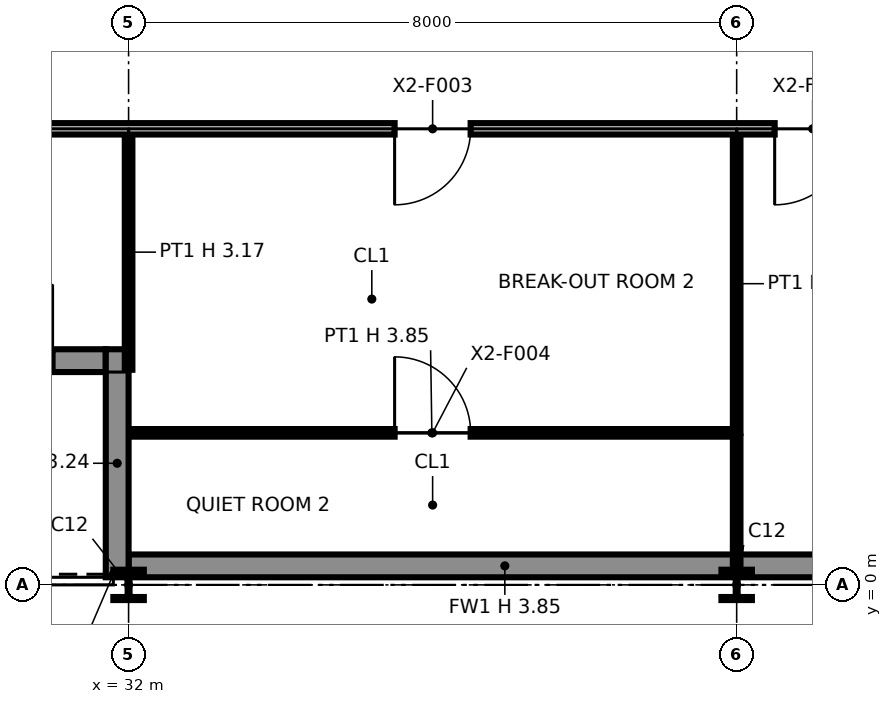
"""IFC4 building model, lengths in metres.
Left out: names, types, materials, properties, quantities, classifications, styles, units other than length and angle.
Written with IfcOpenShell. Run it as: python <this file> out.ifc"""

import sys

from ifc_helpers import new_model, si_unit, direction, frame, frame_2d, origin, origin_2d, place, context, subcontext, project, spatial, rectangle, i_section, extrude, element, fill, save


model = new_model("IFC4")
c1 = context("Model", 3, precision=1e-05, world=origin(), true_north=direction((0.0, 1.0)))
c2 = subcontext(c1, "Body", "Model", "MODEL_VIEW")
j1 = project(units=[si_unit("LENGTHUNIT", "METRE"), si_unit("PLANEANGLEUNIT", "RADIAN")], contexts=[c1])
p1 = place(None, origin())
s1 = spatial("IfcSite", under=j1, at=p1, CompositionType="ELEMENT")
p2 = place(p1, origin())
s2 = spatial("IfcBuilding", under=s1, at=p2, CompositionType="ELEMENT")
p3 = place(p2, frame((0.0, 0.0, 263.0)))
s3 = spatial("IfcBuildingStorey", under=s2, at=p3, CompositionType="ELEMENT", Elevation=263.0)
for number, where, z_axis, x_axis in (
    (1, (32.0, 0.0, 0.0), (0.0, 0.0, 1.0), (1.0, 0.0, 0.0)),
    (2, (40.0, 0.0, 0.0), (0.0, 0.0, 1.0), (1.0, 0.0, 0.0)),
):
    element("IfcColumn", number, at=place(p3, frame(where, z_axis=z_axis, x_axis=x_axis)), inside=s3, PredefinedType="COLUMN", context=c2, shape_type="SweptSolid", body=[
        extrude(i_section(OverallWidth=0.401, OverallDepth=0.399, WebThickness=0.025, FlangeThickness=0.04, at=origin_2d()), origin(), (0.0, 0.0, 1.0), 3.85),
    ])
p4 = place(p3, frame((24.3, 2.95, 0.0), z_axis=(0.0, 0.0, 1.0), x_axis=(1.0, 0.0, 0.0)))
e3 = element("IfcWall", 3, at=p4, inside=s3, PredefinedType="SOLIDWALL", context=c2, shape_type="SweptSolid", body=[
    extrude(rectangle(XDim=7.4, YDim=0.3, at=frame_2d((3.7, 0.0))), origin(), (0.0, 0.0, 1.0), 3.85),
])
p5 = place(p4, frame((0.3, 0.0, 0.9)))
e4 = element("IfcOpeningElement", 4, at=p5, cuts=e3, PredefinedType="OPENING", context=c2, shape_type="SweptSolid", body=[
    extrude(rectangle(XDim=2.8, YDim=2.2, at=frame_2d((1.4, 1.1))), frame((0.0, 0.16, 0.0), z_axis=(0.0, -1.0, 0.0), x_axis=(1.0, 0.0, 0.0)), (0.0, 0.0, 1.0), 0.32),
])
p6 = place(p4, frame((4.7, 0.0, 0.0)))
e5 = element("IfcOpeningElement", 5, at=p6, cuts=e3, PredefinedType="OPENING", context=c2, shape_type="SweptSolid", body=[
    extrude(rectangle(XDim=2.0, YDim=2.4, at=frame_2d((1.0, 1.2))), frame((0.0, 0.16, 0.0), z_axis=(0.0, -1.0, 0.0), x_axis=(1.0, 0.0, 0.0)), (0.0, 0.0, 1.0), 0.32),
])
p7 = place(p3, frame((31.85, 0.1, 0.0), z_axis=(0.0, 0.0, 1.0), x_axis=(0.0, 1.0, 0.0)))
e6 = element("IfcWall", 6, at=p7, inside=s3, PredefinedType="SOLIDWALL", context=c2, shape_type="SweptSolid", body=[
    extrude(rectangle(XDim=3.0, YDim=0.3, at=frame_2d((1.5, 0.0))), origin(), (0.0, 0.0, 1.0), 3.237),
])
p8 = place(p3, frame((32.0, 0.25, 0.0), z_axis=(0.0, 0.0, 1.0), x_axis=(1.0, 0.0, 0.0)))
e7 = element("IfcWall", 7, at=p8, inside=s3, PredefinedType="SOLIDWALL", context=c2, shape_type="SweptSolid", body=[
    extrude(rectangle(XDim=9.9, YDim=0.3, at=frame_2d((4.95, 0.0))), origin(), (0.0, 0.0, 1.0), 3.85),
])
p9 = place(p3, frame((40.0, 0.13, 0.0), z_axis=(0.0, 0.0, 1.0), x_axis=(0.0, 1.0, 0.0)))
e8 = element("IfcWall", 8, at=p9, inside=s3, PredefinedType="PARTITIONING", context=c2, shape_type="SweptSolid", body=[
    extrude(rectangle(XDim=1.82, YDim=0.1, at=frame_2d((0.91, 0.0))), origin(), (0.0, 0.0, 1.0), 3.172),
])
p10 = place(p3, frame((32.03, 2.0, 0.0), z_axis=(0.0, 0.0, 1.0), x_axis=(1.0, 0.0, 0.0)))
e9 = element("IfcWall", 9, at=p10, inside=s3, PredefinedType="PARTITIONING", context=c2, shape_type="SweptSolid", body=[
    extrude(rectangle(XDim=7.92, YDim=0.1, at=frame_2d((3.96, 0.0))), origin(), (0.0, 0.0, 1.0), 3.85),
])
p11 = place(p10, frame((3.47, 0.0, 0.0)))
e10 = element("IfcOpeningElement", 10, at=p11, cuts=e9, PredefinedType="OPENING", context=c2, shape_type="SweptSolid", body=[
    extrude(rectangle(XDim=1.0, YDim=2.1, at=frame_2d((0.5, 1.05))), frame((0.0, 0.06, 0.0), z_axis=(0.0, -1.0, 0.0), x_axis=(1.0, 0.0, 0.0)), (0.0, 0.0, 1.0), 0.12),
])
p12 = place(p3, frame((40.0, 2.0, 0.0), z_axis=(0.0, 0.0, 1.0), x_axis=(0.0, 1.0, 0.0)))
e11 = element("IfcWall", 11, at=p12, inside=s3, PredefinedType="PARTITIONING", context=c2, shape_type="SweptSolid", body=[
    extrude(rectangle(XDim=3.925, YDim=0.1, at=frame_2d((1.962, 0.0))), origin(), (0.0, 0.0, 1.0), 3.172),
])
p13 = place(p3, frame((32.0, 2.83, 0.0), z_axis=(0.0, 0.0, 1.0), x_axis=(0.0, 1.0, 0.0)))
e12 = element("IfcWall", 12, at=p13, inside=s3, PredefinedType="PARTITIONING", context=c2, shape_type="SweptSolid", body=[
    extrude(rectangle(XDim=3.095, YDim=0.1, at=frame_2d((1.547, 0.0))), origin(), (0.0, 0.0, 1.0), 3.172),
])
p14 = place(p3, frame((6.075, 6.0, 0.0), z_axis=(0.0, 0.0, 1.0), x_axis=(1.0, 0.0, 0.0)))
e13 = element("IfcWall", 13, at=p14, inside=s3, PredefinedType="PARTITIONING", context=c2, shape_type="SweptSolid", body=[
    extrude(rectangle(XDim=35.85, YDim=0.15, at=frame_2d((17.925, 0.0))), origin(), (0.0, 0.0, 1.0), 3.85),
])
p15 = place(p14, frame((14.425, 0.0, 0.0), z_axis=(0.0, 0.0, 1.0), x_axis=(-1.0, 0.0, 0.0)))
e14 = element("IfcOpeningElement", 14, at=p15, cuts=e13, PredefinedType="OPENING", context=c2, shape_type="SweptSolid", body=[
    extrude(rectangle(XDim=1.0, YDim=2.1, at=frame_2d((0.5, 1.05))), frame((0.0, 0.085, 0.0), z_axis=(0.0, -1.0, 0.0), x_axis=(1.0, 0.0, 0.0)), (0.0, 0.0, 1.0), 0.17),
])
p16 = place(p14, frame((30.425, 0.0, 0.0), z_axis=(0.0, 0.0, 1.0), x_axis=(-1.0, 0.0, 0.0)))
e15 = element("IfcOpeningElement", 15, at=p16, cuts=e13, PredefinedType="OPENING", context=c2, shape_type="SweptSolid", body=[
    extrude(rectangle(XDim=1.0, YDim=2.1, at=frame_2d((0.5, 1.05))), frame((0.0, 0.085, 0.0), z_axis=(0.0, -1.0, 0.0), x_axis=(1.0, 0.0, 0.0)), (0.0, 0.0, 1.0), 0.17),
])
p17 = place(p14, frame((4.425, 0.0, 0.0), z_axis=(0.0, 0.0, 1.0), x_axis=(-1.0, 0.0, 0.0)))
e16 = element("IfcOpeningElement", 16, at=p17, cuts=e13, PredefinedType="OPENING", context=c2, shape_type="SweptSolid", body=[
    extrude(rectangle(XDim=1.0, YDim=2.1, at=frame_2d((0.5, 1.05))), frame((0.0, 0.085, 0.0), z_axis=(0.0, -1.0, 0.0), x_axis=(1.0, 0.0, 0.0)), (0.0, 0.0, 1.0), 0.17),
])
p18 = place(p14, frame((8.425, 0.0, 0.0), z_axis=(0.0, 0.0, 1.0), x_axis=(-1.0, 0.0, 0.0)))
e17 = element("IfcOpeningElement", 17, at=p18, cuts=e13, PredefinedType="OPENING", context=c2, shape_type="SweptSolid", body=[
    extrude(rectangle(XDim=1.0, YDim=2.1, at=frame_2d((0.5, 1.05))), frame((0.0, 0.085, 0.0), z_axis=(0.0, -1.0, 0.0), x_axis=(1.0, 0.0, 0.0)), (0.0, 0.0, 1.0), 0.17),
])
p19 = place(p14, frame((23.425, 0.0, 0.0), z_axis=(0.0, 0.0, 1.0), x_axis=(-1.0, 0.0, 0.0)))
e18 = element("IfcOpeningElement", 18, at=p19, cuts=e13, PredefinedType="OPENING", context=c2, shape_type="SweptSolid", body=[
    extrude(rectangle(XDim=1.0, YDim=2.1, at=frame_2d((0.5, 1.05))), frame((0.0, 0.085, 0.0), z_axis=(0.0, -1.0, 0.0), x_axis=(1.0, 0.0, 0.0)), (0.0, 0.0, 1.0), 0.17),
])
p20 = place(p14, frame((35.425, 0.0, 0.0), z_axis=(0.0, 0.0, 1.0), x_axis=(-1.0, 0.0, 0.0)))
e19 = element("IfcOpeningElement", 19, at=p20, cuts=e13, PredefinedType="OPENING", context=c2, shape_type="SweptSolid", body=[
    extrude(rectangle(XDim=1.0, YDim=2.1, at=frame_2d((0.5, 1.05))), frame((0.0, 0.085, 0.0), z_axis=(0.0, -1.0, 0.0), x_axis=(1.0, 0.0, 0.0)), (0.0, 0.0, 1.0), 0.17),
])
p21 = place(p16, origin())
e20 = element("IfcDoor", 20, at=p21, inside=s3, OperationType="SINGLE_SWING_RIGHT", PredefinedType="DOOR", context=c2, shape_type="SweptSolid", body=[
    extrude(rectangle(XDim=1.0, YDim=2.1, at=frame_2d((0.5, 1.05))), frame((0.0, 0.025, 0.0), z_axis=(0.0, -1.0, 0.0), x_axis=(1.0, 0.0, 0.0)), (0.0, 0.0, 1.0), 0.05),
])
fill(e15, e20)
p22 = place(p11, origin())
e21 = element("IfcDoor", 21, at=p22, inside=s3, OperationType="SINGLE_SWING_LEFT", PredefinedType="DOOR", context=c2, shape_type="SweptSolid", body=[
    extrude(rectangle(XDim=1.0, YDim=2.1, at=frame_2d((0.5, 1.05))), frame((0.0, 0.025, 0.0), z_axis=(0.0, -1.0, 0.0), x_axis=(1.0, 0.0, 0.0)), (0.0, 0.0, 1.0), 0.05),
])
fill(e10, e21)
p23 = place(p20, origin())
e22 = element("IfcDoor", 22, at=p23, inside=s3, OperationType="SINGLE_SWING_RIGHT", PredefinedType="DOOR", context=c2, shape_type="SweptSolid", body=[
    extrude(rectangle(XDim=1.0, YDim=2.1, at=frame_2d((0.5, 1.05))), frame((0.0, 0.025, 0.0), z_axis=(0.0, -1.0, 0.0), x_axis=(1.0, 0.0, 0.0)), (0.0, 0.0, 1.0), 0.05),
])
fill(e19, e22)
save(model, sys.argv[1])
